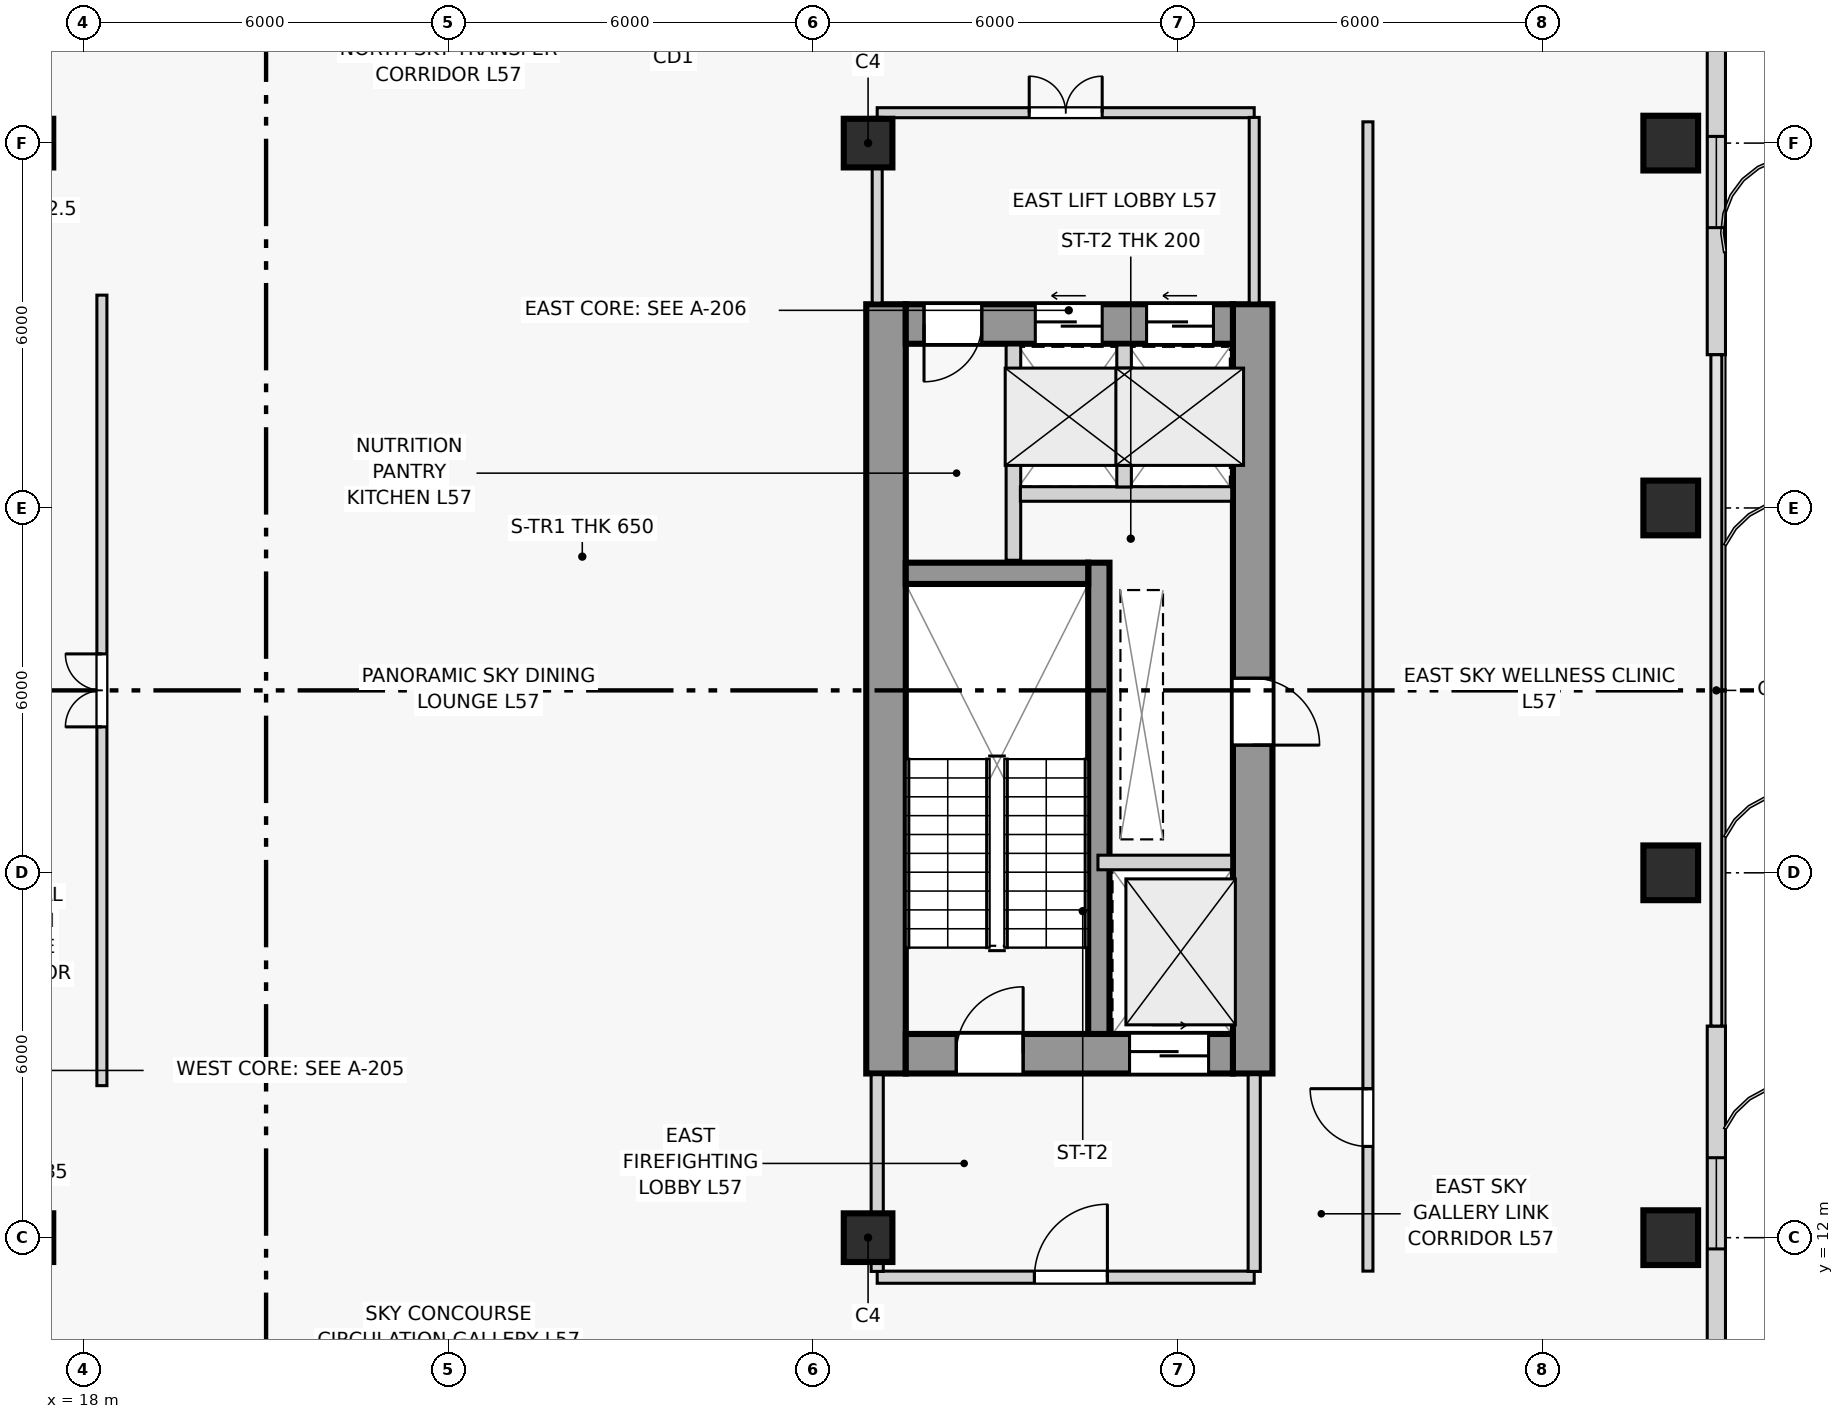
"""IFC4 building model, lengths in metres.
Left out: names, types, materials, properties, quantities, classifications, styles, units other than length and angle.
Written with IfcOpenShell. Run it as: python <this file> out.ifc"""

import sys

from ifc_helpers import new_model, si_unit, direction, frame, frame_2d, origin, origin_2d, place, context, subcontext, project, spatial, rectangle, extrude, source, transform, mapped, element, fill, save


model = new_model("IFC4")
c1 = context("Model", 3, precision=1e-05, world=origin(), true_north=direction((0.0, 1.0)))
c2 = subcontext(c1, "Body", "Model", "MODEL_VIEW")
j1 = project(units=[si_unit("LENGTHUNIT", "METRE"), si_unit("PLANEANGLEUNIT", "RADIAN")], contexts=[c1])
p1 = place(None, origin())
s1 = spatial("IfcSite", under=j1, at=p1, CompositionType="ELEMENT")
p2 = place(p1, origin())
s2 = spatial("IfcBuilding", under=s1, at=p2, CompositionType="ELEMENT")
p3 = place(p2, frame((0.0, 0.0, 216.9)))
s3 = spatial("IfcBuildingStorey", under=s2, at=p3, CompositionType="ELEMENT", Elevation=216.9)
p4 = place(p3, frame((31.195, 14.7, 0.0), z_axis=(0.0, 0.0, 1.0), x_axis=(0.0, 1.0, 0.0)))
e1 = element("IfcWall", 1, at=p4, inside=s3, PredefinedType="SHEAR", context=c2, shape_type="SweptSolid", body=[
    extrude(rectangle(XDim=12.65, YDim=0.65, at=frame_2d((6.325, 0.0))), origin(), (0.0, 0.0, 1.0), 3.6),
])
p5 = place(p3, frame((37.225, 14.7, 0.0), z_axis=(0.0, 0.0, 1.0), x_axis=(0.0, 1.0, 0.0)))
e2 = element("IfcWall", 2, at=p5, inside=s3, PredefinedType="SHEAR", context=c2, shape_type="SweptSolid", body=[
    extrude(rectangle(XDim=12.65, YDim=0.65, at=frame_2d((6.325, 0.0))), origin(), (0.0, 0.0, 1.0), 3.6),
])
p6 = place(p5, frame((5.4, 0.0, 0.0)))
e3 = element("IfcOpeningElement", 3, at=p6, cuts=e2, PredefinedType="OPENING", context=c2, shape_type="SweptSolid", body=[
    extrude(rectangle(XDim=1.1, YDim=2.2, at=frame_2d((0.55, 1.1))), frame((0.0, 0.335, 0.0), z_axis=(0.0, -1.0, 0.0), x_axis=(1.0, 0.0, 0.0)), (0.0, 0.0, 1.0), 0.67),
])
p7 = place(p3, frame((31.52, 15.025, 0.0), z_axis=(0.0, 0.0, 1.0), x_axis=(1.0, 0.0, 0.0)))
e4 = element("IfcWall", 4, at=p7, inside=s3, PredefinedType="SHEAR", context=c2, shape_type="SweptSolid", body=[
    extrude(rectangle(XDim=5.38, YDim=0.65, at=frame_2d((2.69, 0.0))), origin(), (0.0, 0.0, 1.0), 3.6),
])
p8 = place(p7, frame((0.83, 0.0, 0.0)))
e5 = element("IfcOpeningElement", 5, at=p8, cuts=e4, PredefinedType="OPENING", context=c2, shape_type="SweptSolid", body=[
    extrude(rectangle(XDim=1.1, YDim=2.2, at=frame_2d((0.55, 1.1))), frame((0.0, 0.335, 0.0), z_axis=(0.0, -1.0, 0.0), x_axis=(1.0, 0.0, 0.0)), (0.0, 0.0, 1.0), 0.67),
])
p9 = place(p7, frame((3.68, 0.0, 0.0)))
e6 = element("IfcOpeningElement", 6, at=p9, cuts=e4, PredefinedType="OPENING", context=c2, shape_type="SweptSolid", body=[
    extrude(rectangle(XDim=1.3, YDim=2.2, at=frame_2d((0.65, 1.1))), frame((0.0, 0.335, 0.0), z_axis=(0.0, -1.0, 0.0), x_axis=(1.0, 0.0, 0.0)), (0.0, 0.0, 1.0), 0.67),
])
p10 = place(p3, frame((31.52, 27.025, 0.0), z_axis=(0.0, 0.0, 1.0), x_axis=(1.0, 0.0, 0.0)))
e7 = element("IfcWall", 7, at=p10, inside=s3, PredefinedType="SHEAR", context=c2, shape_type="SweptSolid", body=[
    extrude(rectangle(XDim=5.38, YDim=0.65, at=frame_2d((2.69, 0.0))), origin(), (0.0, 0.0, 1.0), 3.6),
])
p11 = place(p10, frame((0.3, 0.0, 0.0)))
e8 = element("IfcOpeningElement", 8, at=p11, cuts=e7, PredefinedType="OPENING", context=c2, shape_type="SweptSolid", body=[
    extrude(rectangle(XDim=0.95, YDim=2.1, at=frame_2d((0.475, 1.05))), frame((0.0, 0.335, 0.0), z_axis=(0.0, -1.0, 0.0), x_axis=(1.0, 0.0, 0.0)), (0.0, 0.0, 1.0), 0.67),
])
p12 = place(p10, frame((2.13, 0.0, 0.0)))
e9 = element("IfcOpeningElement", 9, at=p12, cuts=e7, PredefinedType="OPENING", context=c2, shape_type="SweptSolid", body=[
    extrude(rectangle(XDim=1.1, YDim=2.2, at=frame_2d((0.55, 1.1))), frame((0.0, 0.335, 0.0), z_axis=(0.0, -1.0, 0.0), x_axis=(1.0, 0.0, 0.0)), (0.0, 0.0, 1.0), 0.67),
])
p13 = place(p10, frame((3.96, 0.0, 0.0)))
e10 = element("IfcOpeningElement", 10, at=p13, cuts=e7, PredefinedType="OPENING", context=c2, shape_type="SweptSolid", body=[
    extrude(rectangle(XDim=1.1, YDim=2.2, at=frame_2d((0.55, 1.1))), frame((0.0, 0.335, 0.0), z_axis=(0.0, -1.0, 0.0), x_axis=(1.0, 0.0, 0.0)), (0.0, 0.0, 1.0), 0.67),
])
p14 = place(p3, frame((34.695, 15.35, 0.0), z_axis=(0.0, 0.0, 1.0), x_axis=(0.0, 1.0, 0.0)))
e11 = element("IfcWall", 11, at=p14, inside=s3, PredefinedType="SHEAR", context=c2, shape_type="SweptSolid", body=[
    extrude(rectangle(XDim=7.75, YDim=0.35, at=frame_2d((3.875, 0.0))), origin(), (0.0, 0.0, 1.0), 3.6),
])
p15 = place(p3, frame((31.52, 22.925, 0.0), z_axis=(0.0, 0.0, 1.0), x_axis=(1.0, 0.0, 0.0)))
e12 = element("IfcWall", 12, at=p15, inside=s3, PredefinedType="SHEAR", context=c2, shape_type="SweptSolid", body=[
    extrude(rectangle(XDim=3.0, YDim=0.35, at=frame_2d((1.5, 0.0))), origin(), (0.0, 0.0, 1.0), 3.6),
])
m1 = source(origin(), c2, "Body", "SweptSolid", [
    extrude(rectangle(XDim=0.9, YDim=0.9, at=origin_2d()), origin(), (0.0, 0.0, 1.0), 3.6),
])
for number, where, z_axis, x_axis in (
    (13, (44.1, 12.0, 0.0), (0.0, 0.0, 1.0), (1.0, 0.0, 0.0)),
    (14, (44.1, 18.0, 0.0), (0.0, 0.0, 1.0), (1.0, 0.0, 0.0)),
    (15, (44.1, 24.0, 0.0), (0.0, 0.0, 1.0), (1.0, 0.0, 0.0)),
    (16, (44.1, 30.0, 0.0), (0.0, 0.0, 1.0), (1.0, 0.0, 0.0)),
):
    element("IfcColumn", number, at=place(p3, frame(where, z_axis=z_axis, x_axis=x_axis)), inside=s3, PredefinedType="COLUMN", context=c2, shape_type="MappedRepresentation", body=[
        mapped(m1, transform((0.0, 0.0, 0.0), scale=1.0)),
    ])
m2 = source(origin(), c2, "Body", "SweptSolid", [
    extrude(rectangle(XDim=0.8, YDim=0.8, at=origin_2d()), origin(), (0.0, 0.0, 1.0), 3.6),
])
for number, where, z_axis, x_axis in (
    (17, (17.1, 12.0, 0.0), (0.0, 0.0, 1.0), (1.0, 0.0, 0.0)),
    (18, (17.1, 30.0, 0.0), (0.0, 0.0, 1.0), (1.0, 0.0, 0.0)),
    (19, (30.9, 12.0, 0.0), (0.0, 0.0, 1.0), (1.0, 0.0, 0.0)),
    (20, (30.9, 30.0, 0.0), (0.0, 0.0, 1.0), (1.0, 0.0, 0.0)),
):
    element("IfcColumn", number, at=place(p3, frame(where, z_axis=z_axis, x_axis=x_axis)), inside=s3, PredefinedType="COLUMN", context=c2, shape_type="MappedRepresentation", body=[
        mapped(m2, transform((0.0, 0.0, 0.0), scale=1.0)),
    ])
p16 = place(p3, frame((44.85, 3.75, 0.0), z_axis=(0.0, 0.0, 1.0), x_axis=(0.0, 1.0, 0.0)))
e21 = element("IfcWall", 21, at=p16, inside=s3, PredefinedType="SOLIDWALL", context=c2, shape_type="SweptSolid", body=[
    extrude(rectangle(XDim=11.73, YDim=0.3, at=frame_2d((5.865, 0.0))), origin(), (0.0, 0.0, 1.0), 3.28),
])
p17 = place(p16, frame((2.3, 0.0, 0.85)))
e22 = element("IfcOpeningElement", 22, at=p17, cuts=e21, PredefinedType="OPENING", context=c2, shape_type="SweptSolid", body=[
    extrude(rectangle(XDim=1.5, YDim=1.8, at=frame_2d((0.75, 0.9))), frame((0.0, 0.16, 0.0), z_axis=(0.0, -1.0, 0.0), x_axis=(1.0, 0.0, 0.0)), (0.0, 0.0, 1.0), 0.32),
])
p18 = place(p16, frame((8.065, 0.0, 0.85)))
e23 = element("IfcOpeningElement", 23, at=p18, cuts=e21, PredefinedType="OPENING", context=c2, shape_type="SweptSolid", body=[
    extrude(rectangle(XDim=1.5, YDim=1.8, at=frame_2d((0.75, 0.9))), frame((0.0, 0.16, 0.0), z_axis=(0.0, -1.0, 0.0), x_axis=(1.0, 0.0, 0.0)), (0.0, 0.0, 1.0), 0.32),
])
p19 = place(p3, frame((44.85, 26.52, 0.0), z_axis=(0.0, 0.0, 1.0), x_axis=(0.0, 1.0, 0.0)))
e24 = element("IfcWall", 24, at=p19, inside=s3, PredefinedType="SOLIDWALL", context=c2, shape_type="SweptSolid", body=[
    extrude(rectangle(XDim=11.73, YDim=0.3, at=frame_2d((5.865, 0.0))), origin(), (0.0, 0.0, 1.0), 3.28),
])
p20 = place(p19, frame((2.09, 0.0, 0.85)))
e25 = element("IfcOpeningElement", 25, at=p20, cuts=e24, PredefinedType="OPENING", context=c2, shape_type="SweptSolid", body=[
    extrude(rectangle(XDim=1.5, YDim=1.8, at=frame_2d((0.75, 0.9))), frame((0.0, 0.16, 0.0), z_axis=(0.0, -1.0, 0.0), x_axis=(1.0, 0.0, 0.0)), (0.0, 0.0, 1.0), 0.32),
])
p21 = place(p19, frame((7.855, 0.0, 0.85)))
e26 = element("IfcOpeningElement", 26, at=p21, cuts=e24, PredefinedType="OPENING", context=c2, shape_type="SweptSolid", body=[
    extrude(rectangle(XDim=1.5, YDim=1.8, at=frame_2d((0.75, 0.9))), frame((0.0, 0.16, 0.0), z_axis=(0.0, -1.0, 0.0), x_axis=(1.0, 0.0, 0.0)), (0.0, 0.0, 1.0), 0.32),
])
p22 = place(p3, frame((34.68, 18.17, 0.0), z_axis=(0.0, 0.0, 1.0), x_axis=(1.0, 0.0, 0.0)))
e27 = element("IfcWall", 27, at=p22, inside=s3, PredefinedType="PARTITIONING", context=c2, shape_type="SweptSolid", body=[
    extrude(rectangle(XDim=2.2, YDim=0.24, at=frame_2d((1.1, 0.0))), origin(), (0.0, 0.0, 1.0), 3.28),
])
p23 = place(p3, frame((31.05, 11.35, 0.0), z_axis=(0.0, 0.0, 1.0), x_axis=(1.0, 0.0, 0.0)))
e28 = element("IfcWall", 28, at=p23, inside=s3, PredefinedType="PARTITIONING", context=c2, shape_type="SweptSolid", body=[
    extrude(rectangle(XDim=6.2, YDim=0.2, at=frame_2d((3.1, 0.0))), origin(), (0.0, 0.0, 1.0), 3.28),
])
p24 = place(p23, frame((2.586, 0.0, 0.0)))
e29 = element("IfcOpeningElement", 29, at=p24, cuts=e28, PredefinedType="OPENING", context=c2, shape_type="SweptSolid", body=[
    extrude(rectangle(XDim=1.2, YDim=2.2, at=frame_2d((0.6, 1.1))), frame((0.0, 0.11, 0.0), z_axis=(0.0, -1.0, 0.0), x_axis=(1.0, 0.0, 0.0)), (0.0, 0.0, 1.0), 0.22),
])
p25 = place(p3, frame((31.05, 11.445, 0.0), z_axis=(0.0, 0.0, 1.0), x_axis=(0.0, 1.0, 0.0)))
e30 = element("IfcWall", 30, at=p25, inside=s3, PredefinedType="PARTITIONING", context=c2, shape_type="SweptSolid", body=[
    extrude(rectangle(XDim=3.235, YDim=0.2, at=frame_2d((1.617, 0.0))), origin(), (0.0, 0.0, 1.0), 2.821),
])
p26 = place(p3, frame((37.25, 11.445, 0.0), z_axis=(0.0, 0.0, 1.0), x_axis=(0.0, 1.0, 0.0)))
e31 = element("IfcWall", 31, at=p26, inside=s3, PredefinedType="PARTITIONING", context=c2, shape_type="SweptSolid", body=[
    extrude(rectangle(XDim=3.235, YDim=0.2, at=frame_2d((1.617, 0.0))), origin(), (0.0, 0.0, 1.0), 3.28),
])
p27 = place(p3, frame((33.29, 23.14, 0.0), z_axis=(0.0, 0.0, 1.0), x_axis=(0.0, 1.0, 0.0)))
e32 = element("IfcWall", 32, at=p27, inside=s3, PredefinedType="PARTITIONING", context=c2, shape_type="SweptSolid", body=[
    extrude(rectangle(XDim=3.54, YDim=0.24, at=frame_2d((1.77, 0.0))), origin(), (0.0, 0.0, 1.0), 3.28),
])
p28 = place(p3, frame((33.405, 24.23, 0.0), z_axis=(0.0, 0.0, 1.0), x_axis=(1.0, 0.0, 0.0)))
e33 = element("IfcWall", 33, at=p28, inside=s3, PredefinedType="PARTITIONING", context=c2, shape_type="SweptSolid", body=[
    extrude(rectangle(XDim=3.475, YDim=0.24, at=frame_2d((1.737, 0.0))), origin(), (0.0, 0.0, 1.0), 3.28),
])
p29 = place(p3, frame((35.11, 24.345, 0.0), z_axis=(0.0, 0.0, 1.0), x_axis=(0.0, 1.0, 0.0)))
e34 = element("IfcWall", 34, at=p29, inside=s3, PredefinedType="PARTITIONING", context=c2, shape_type="SweptSolid", body=[
    extrude(rectangle(XDim=2.335, YDim=0.24, at=frame_2d((1.167, 0.0))), origin(), (0.0, 0.0, 1.0), 3.28),
])
p30 = place(p3, frame((31.05, 30.5, 0.0), z_axis=(0.0, 0.0, 1.0), x_axis=(1.0, 0.0, 0.0)))
e35 = element("IfcWall", 35, at=p30, inside=s3, PredefinedType="PARTITIONING", context=c2, shape_type="SweptSolid", body=[
    extrude(rectangle(XDim=6.2, YDim=0.165, at=frame_2d((3.1, 0.0))), origin(), (0.0, 0.0, 1.0), 3.28),
])
p31 = place(p30, frame((2.5, 0.0, 0.0)))
e36 = element("IfcOpeningElement", 36, at=p31, cuts=e35, PredefinedType="OPENING", context=c2, shape_type="SweptSolid", body=[
    extrude(rectangle(XDim=1.2, YDim=2.2, at=frame_2d((0.6, 1.1))), frame((0.0, 0.093, 0.0), z_axis=(0.0, -1.0, 0.0), x_axis=(1.0, 0.0, 0.0)), (0.0, 0.0, 1.0), 0.185),
])
p32 = place(p3, frame((31.05, 27.37, 0.0), z_axis=(0.0, 0.0, 1.0), x_axis=(0.0, 1.0, 0.0)))
e37 = element("IfcWall", 37, at=p32, inside=s3, PredefinedType="PARTITIONING", context=c2, shape_type="SweptSolid", body=[
    extrude(rectangle(XDim=3.052, YDim=0.165, at=frame_2d((1.526, 0.0))), origin(), (0.0, 0.0, 1.0), 2.821),
])
p33 = place(p3, frame((37.25, 27.37, 0.0), z_axis=(0.0, 0.0, 1.0), x_axis=(0.0, 1.0, 0.0)))
e38 = element("IfcWall", 38, at=p33, inside=s3, PredefinedType="PARTITIONING", context=c2, shape_type="SweptSolid", body=[
    extrude(rectangle(XDim=3.052, YDim=0.165, at=frame_2d((1.526, 0.0))), origin(), (0.0, 0.0, 1.0), 3.28),
])
p34 = place(p3, frame((39.12, 11.45, 0.0), z_axis=(0.0, 0.0, 1.0), x_axis=(0.0, 1.0, 0.0)))
e39 = element("IfcWall", 39, at=p34, inside=s3, PredefinedType="PARTITIONING", context=c2, shape_type="SweptSolid", body=[
    extrude(rectangle(XDim=18.9, YDim=0.165, at=frame_2d((9.45, 0.0))), origin(), (0.0, 0.0, 1.0), 3.28),
])
p35 = place(p34, frame((2.05, 0.0, 0.0)))
e40 = element("IfcOpeningElement", 40, at=p35, cuts=e39, PredefinedType="OPENING", context=c2, shape_type="SweptSolid", body=[
    extrude(rectangle(XDim=0.95, YDim=2.1, at=frame_2d((0.475, 1.05))), frame((0.0, 0.093, 0.0), z_axis=(0.0, -1.0, 0.0), x_axis=(1.0, 0.0, 0.0)), (0.0, 0.0, 1.0), 0.185),
])
p36 = place(p3, frame((18.3, 14.5, 0.0), z_axis=(0.0, 0.0, 1.0), x_axis=(0.0, 1.0, 0.0)))
e41 = element("IfcWall", 41, at=p36, inside=s3, PredefinedType="PARTITIONING", context=c2, shape_type="SweptSolid", body=[
    extrude(rectangle(XDim=13.0, YDim=0.165, at=frame_2d((6.5, 0.0))), origin(), (0.0, 0.0, 1.0), 3.28),
])
p37 = place(p36, frame((5.9, 0.0, 0.0)))
e42 = element("IfcOpeningElement", 42, at=p37, cuts=e41, PredefinedType="OPENING", context=c2, shape_type="SweptSolid", body=[
    extrude(rectangle(XDim=1.2, YDim=2.2, at=frame_2d((0.6, 1.1))), frame((0.0, 0.093, 0.0), z_axis=(0.0, -1.0, 0.0), x_axis=(1.0, 0.0, 0.0)), (0.0, 0.0, 1.0), 0.185),
])
m3 = source(origin(), c2, "Body", "SweptSolid", [
    extrude(rectangle(XDim=1.5, YDim=1.8, at=frame_2d((0.75, 0.9))), frame((0.0, 0.03, 0.0), z_axis=(0.0, -1.0, 0.0), x_axis=(1.0, 0.0, 0.0)), (0.0, 0.0, 1.0), 0.06),
])
p38 = place(p18, origin())
e43 = element("IfcWindow", 43, at=p38, inside=s3, PartitioningType="SINGLE_PANEL", PredefinedType="WINDOW", context=c2, shape_type="MappedRepresentation", body=[
    mapped(m3, transform((0.0, 0.0, 0.0), scale=1.0)),
])
fill(e23, e43)
p39 = place(p20, origin())
e44 = element("IfcWindow", 44, at=p39, inside=s3, PartitioningType="SINGLE_PANEL", PredefinedType="WINDOW", context=c2, shape_type="MappedRepresentation", body=[
    mapped(m3, transform((0.0, 0.0, 0.0), scale=1.0)),
])
fill(e25, e44)
m4 = source(origin(), c2, "Body", "SweptSolid", [
    extrude(rectangle(XDim=1.1, YDim=2.2, at=frame_2d((0.55, 1.1))), frame((0.0, 0.025, 0.0), z_axis=(0.0, -1.0, 0.0), x_axis=(1.0, 0.0, 0.0)), (0.0, 0.0, 1.0), 0.05),
])
p40 = place(p8, origin())
e45 = element("IfcDoor", 45, at=p40, inside=s3, OperationType="SINGLE_SWING_RIGHT", PredefinedType="DOOR", context=c2, shape_type="MappedRepresentation", body=[
    mapped(m4, transform((0.0, 0.0, 0.0), scale=1.0)),
])
fill(e5, e45)
m5 = source(origin(), c2, "Body", "SweptSolid", [
    extrude(rectangle(XDim=1.3, YDim=2.2, at=frame_2d((0.65, 1.1))), frame((0.0, 0.025, 0.0), z_axis=(0.0, -1.0, 0.0), x_axis=(1.0, 0.0, 0.0)), (0.0, 0.0, 1.0), 0.05),
])
p41 = place(p9, origin())
e46 = element("IfcDoor", 46, at=p41, inside=s3, OperationType="SLIDING_TO_RIGHT", PredefinedType="DOOR", context=c2, shape_type="MappedRepresentation", body=[
    mapped(m5, transform((0.0, 0.0, 0.0), scale=1.0)),
])
fill(e6, e46)
m6 = source(origin(), c2, "Body", "SweptSolid", [
    extrude(rectangle(XDim=1.2, YDim=2.2, at=frame_2d((0.6, 1.1))), frame((0.0, 0.025, 0.0), z_axis=(0.0, -1.0, 0.0), x_axis=(1.0, 0.0, 0.0)), (0.0, 0.0, 1.0), 0.05),
])
p42 = place(p24, origin())
e47 = element("IfcDoor", 47, at=p42, inside=s3, OperationType="SINGLE_SWING_RIGHT", PredefinedType="DOOR", context=c2, shape_type="MappedRepresentation", body=[
    mapped(m6, transform((0.0, 0.0, 0.0), scale=1.0)),
])
fill(e29, e47)
m7 = source(origin(), c2, "Body", "SweptSolid", [
    extrude(rectangle(XDim=0.95, YDim=2.1, at=frame_2d((0.475, 1.05))), frame((0.0, 0.025, 0.0), z_axis=(0.0, -1.0, 0.0), x_axis=(1.0, 0.0, 0.0)), (0.0, 0.0, 1.0), 0.05),
])
p43 = place(p11, frame((0.95, 0.0, 0.0), z_axis=(0.0, 0.0, 1.0), x_axis=(-1.0, 0.0, 0.0)))
e48 = element("IfcDoor", 48, at=p43, inside=s3, OperationType="SINGLE_SWING_RIGHT", PredefinedType="DOOR", context=c2, shape_type="MappedRepresentation", body=[
    mapped(m7, transform((0.0, 0.0, 0.0), scale=1.0)),
])
fill(e8, e48)
m8 = source(origin(), c2, "Body", "SweptSolid", [
    extrude(rectangle(XDim=1.1, YDim=2.2, at=frame_2d((0.55, 1.1))), frame((0.0, 0.025, 0.0), z_axis=(0.0, -1.0, 0.0), x_axis=(1.0, 0.0, 0.0)), (0.0, 0.0, 1.0), 0.05),
])
p44 = place(p12, origin())
e49 = element("IfcDoor", 49, at=p44, inside=s3, OperationType="SLIDING_TO_LEFT", PredefinedType="DOOR", context=c2, shape_type="MappedRepresentation", body=[
    mapped(m8, transform((0.0, 0.0, 0.0), scale=1.0)),
])
fill(e9, e49)
p45 = place(p13, origin())
e50 = element("IfcDoor", 50, at=p45, inside=s3, OperationType="SLIDING_TO_LEFT", PredefinedType="DOOR", context=c2, shape_type="MappedRepresentation", body=[
    mapped(m8, transform((0.0, 0.0, 0.0), scale=1.0)),
])
fill(e10, e50)
p46 = place(p31, origin())
e51 = element("IfcDoor", 51, at=p46, inside=s3, OperationType="DOUBLE_DOOR_SINGLE_SWING", PredefinedType="DOOR", context=c2, shape_type="MappedRepresentation", body=[
    mapped(m6, transform((0.0, 0.0, 0.0), scale=1.0)),
])
fill(e36, e51)
p47 = place(p6, frame((1.1, 0.0, 0.0), z_axis=(0.0, 0.0, 1.0), x_axis=(-1.0, 0.0, 0.0)))
e52 = element("IfcDoor", 52, at=p47, inside=s3, OperationType="SINGLE_SWING_RIGHT", PredefinedType="DOOR", context=c2, shape_type="MappedRepresentation", body=[
    mapped(m4, transform((0.0, 0.0, 0.0), scale=1.0)),
])
fill(e3, e52)
p48 = place(p37, origin())
e53 = element("IfcDoor", 53, at=p48, inside=s3, OperationType="DOUBLE_DOOR_SINGLE_SWING", PredefinedType="DOOR", context=c2, shape_type="MappedRepresentation", body=[
    mapped(m6, transform((0.0, 0.0, 0.0), scale=1.0)),
])
fill(e42, e53)
p49 = place(p35, origin())
e54 = element("IfcDoor", 54, at=p49, inside=s3, OperationType="SINGLE_SWING_RIGHT", PredefinedType="DOOR", context=c2, shape_type="MappedRepresentation", body=[
    mapped(m7, transform((0.0, 0.0, 0.0), scale=1.0)),
])
fill(e40, e54)
save(model, sys.argv[1])
